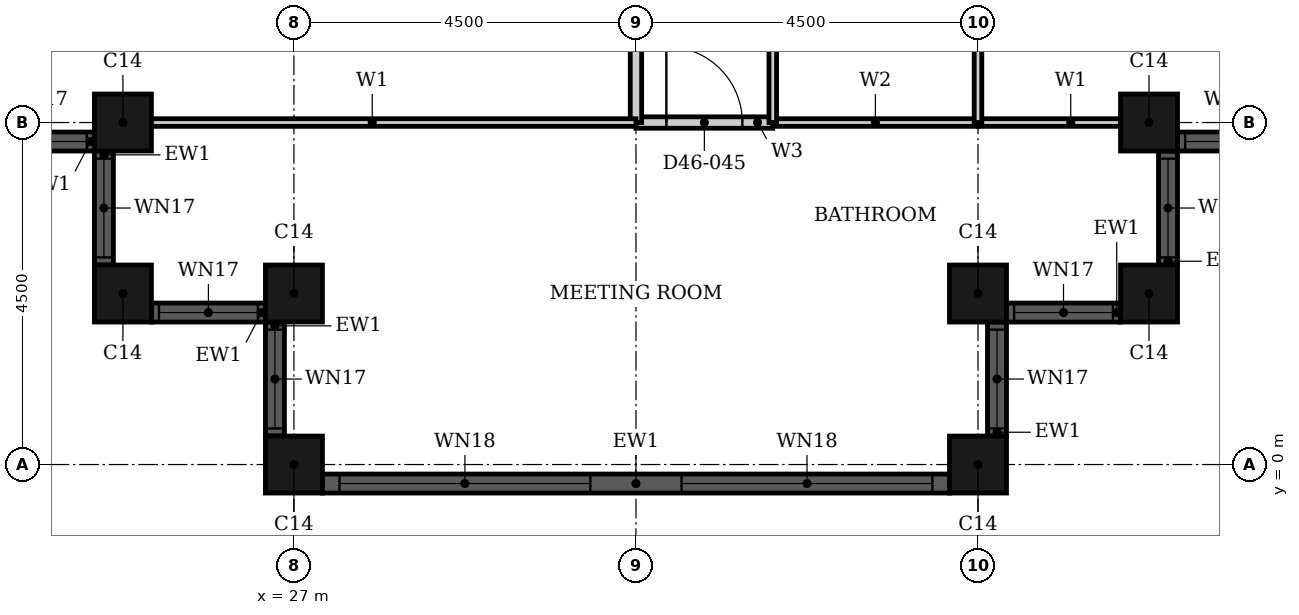
"""IFC4 building model, lengths in metres.
Left out: names, types, materials, properties, quantities, classifications, styles, units other than length and angle.
Written with IfcOpenShell. Run it as: python <this file> out.ifc"""

import sys

from ifc_helpers import new_model, si_unit, direction, frame, frame_2d, origin, origin_2d, place, context, subcontext, project, spatial, rectangle, hollow_rectangle, extrude, element, fill, save


model = new_model("IFC4")
c1 = context("Model", 3, precision=1e-05, world=origin(), true_north=direction((0.0, 1.0)))
c2 = subcontext(c1, "Body", "Model", "MODEL_VIEW")
j1 = project(units=[si_unit("LENGTHUNIT", "METRE"), si_unit("PLANEANGLEUNIT", "RADIAN")], contexts=[c1])
p1 = place(None, origin())
s1 = spatial("IfcSite", under=j1, at=p1, CompositionType="ELEMENT")
p2 = place(p1, origin())
s2 = spatial("IfcBuilding", under=s1, at=p2, CompositionType="ELEMENT")
p3 = place(p2, frame((0.0, 0.0, 183.9)))
s3 = spatial("IfcBuildingStorey", under=s2, at=p3, CompositionType="ELEMENT", Elevation=183.9)
for number, where, z_axis, x_axis in (
    (1, (24.75, 4.5, 0.0), (0.0, 0.0, 1.0), (1.0, 0.0, 0.0)),
    (2, (24.75, 2.25, 0.0), (0.0, 0.0, 1.0), (1.0, 0.0, 0.0)),
    (3, (27.0, 2.25, 0.0), (0.0, 0.0, 1.0), (1.0, 0.0, 0.0)),
    (4, (27.0, 0.0, 0.0), (0.0, 0.0, 1.0), (1.0, 0.0, 0.0)),
    (5, (36.0, 0.0, 0.0), (0.0, 0.0, 1.0), (1.0, 0.0, 0.0)),
    (6, (36.0, 2.25, 0.0), (0.0, 0.0, 1.0), (1.0, 0.0, 0.0)),
    (7, (38.25, 2.25, 0.0), (0.0, 0.0, 1.0), (1.0, 0.0, 0.0)),
    (8, (38.25, 4.5, 0.0), (0.0, 0.0, 1.0), (1.0, 0.0, 0.0)),
):
    element("IfcColumn", number, at=place(p3, frame(where, z_axis=z_axis, x_axis=x_axis)), inside=s3, PredefinedType="COLUMN", context=c2, shape_type="SweptSolid", body=[
        extrude(hollow_rectangle(XDim=0.75, YDim=0.75, WallThickness=0.024, at=origin_2d()), origin(), (0.0, 0.0, 1.0), 3.7),
    ])
p4 = place(p3, frame((22.875, 4.25, 0.0), z_axis=(0.0, 0.0, 1.0), x_axis=(1.0, 0.0, 0.0)))
e9 = element("IfcWall", 9, at=p4, inside=s3, PredefinedType="SOLIDWALL", context=c2, shape_type="SweptSolid", body=[
    extrude(rectangle(XDim=1.5, YDim=0.25, at=frame_2d((0.75, 0.0))), origin(), (0.0, 0.0, 1.0), 3.7),
])
p5 = place(p4, frame((0.1, 0.0, 0.9)))
e10 = element("IfcOpeningElement", 10, at=p5, cuts=e9, PredefinedType="OPENING", context=c2, shape_type="SweptSolid", body=[
    extrude(rectangle(XDim=1.3, YDim=1.95, at=frame_2d((0.65, 0.975))), frame((0.0, 0.135, 0.0), z_axis=(0.0, -1.0, 0.0), x_axis=(1.0, 0.0, 0.0)), (0.0, 0.0, 1.0), 0.27),
])
p6 = place(p3, frame((24.5, 4.125, 0.0), z_axis=(0.0, 0.0, 1.0), x_axis=(0.0, -1.0, 0.0)))
e11 = element("IfcWall", 11, at=p6, inside=s3, PredefinedType="SOLIDWALL", context=c2, shape_type="SweptSolid", body=[
    extrude(rectangle(XDim=1.5, YDim=0.25, at=frame_2d((0.75, 0.0))), origin(), (0.0, 0.0, 1.0), 3.7),
])
p7 = place(p6, frame((0.1, 0.0, 0.9)))
e12 = element("IfcOpeningElement", 12, at=p7, cuts=e11, PredefinedType="OPENING", context=c2, shape_type="SweptSolid", body=[
    extrude(rectangle(XDim=1.3, YDim=1.95, at=frame_2d((0.65, 0.975))), frame((0.0, 0.135, 0.0), z_axis=(0.0, -1.0, 0.0), x_axis=(1.0, 0.0, 0.0)), (0.0, 0.0, 1.0), 0.27),
])
p8 = place(p3, frame((25.125, 2.0, 0.0), z_axis=(0.0, 0.0, 1.0), x_axis=(1.0, 0.0, 0.0)))
e13 = element("IfcWall", 13, at=p8, inside=s3, PredefinedType="SOLIDWALL", context=c2, shape_type="SweptSolid", body=[
    extrude(rectangle(XDim=1.5, YDim=0.25, at=frame_2d((0.75, 0.0))), origin(), (0.0, 0.0, 1.0), 3.7),
])
p9 = place(p8, frame((0.1, 0.0, 0.9)))
e14 = element("IfcOpeningElement", 14, at=p9, cuts=e13, PredefinedType="OPENING", context=c2, shape_type="SweptSolid", body=[
    extrude(rectangle(XDim=1.3, YDim=1.95, at=frame_2d((0.65, 0.975))), frame((0.0, 0.135, 0.0), z_axis=(0.0, -1.0, 0.0), x_axis=(1.0, 0.0, 0.0)), (0.0, 0.0, 1.0), 0.27),
])
p10 = place(p3, frame((26.75, 1.875, 0.0), z_axis=(0.0, 0.0, 1.0), x_axis=(0.0, -1.0, 0.0)))
e15 = element("IfcWall", 15, at=p10, inside=s3, PredefinedType="SOLIDWALL", context=c2, shape_type="SweptSolid", body=[
    extrude(rectangle(XDim=1.5, YDim=0.25, at=frame_2d((0.75, 0.0))), origin(), (0.0, 0.0, 1.0), 3.7),
])
p11 = place(p10, frame((0.1, 0.0, 0.9)))
e16 = element("IfcOpeningElement", 16, at=p11, cuts=e15, PredefinedType="OPENING", context=c2, shape_type="SweptSolid", body=[
    extrude(rectangle(XDim=1.3, YDim=1.95, at=frame_2d((0.65, 0.975))), frame((0.0, 0.135, 0.0), z_axis=(0.0, -1.0, 0.0), x_axis=(1.0, 0.0, 0.0)), (0.0, 0.0, 1.0), 0.27),
])
p12 = place(p3, frame((27.375, -0.25, 0.0), z_axis=(0.0, 0.0, 1.0), x_axis=(1.0, 0.0, 0.0)))
e17 = element("IfcWall", 17, at=p12, inside=s3, PredefinedType="SOLIDWALL", context=c2, shape_type="SweptSolid", body=[
    extrude(rectangle(XDim=8.25, YDim=0.25, at=frame_2d((4.125, 0.0))), origin(), (0.0, 0.0, 1.0), 3.7),
])
p13 = place(p12, frame((0.225, 0.0, 0.45)))
e18 = element("IfcOpeningElement", 18, at=p13, cuts=e17, PredefinedType="OPENING", context=c2, shape_type="SweptSolid", body=[
    extrude(rectangle(XDim=3.3, YDim=2.4, at=frame_2d((1.65, 1.2))), frame((0.0, 0.135, 0.0), z_axis=(0.0, -1.0, 0.0), x_axis=(1.0, 0.0, 0.0)), (0.0, 0.0, 1.0), 0.27),
])
p14 = place(p12, frame((4.725, 0.0, 0.45)))
e19 = element("IfcOpeningElement", 19, at=p14, cuts=e17, PredefinedType="OPENING", context=c2, shape_type="SweptSolid", body=[
    extrude(rectangle(XDim=3.3, YDim=2.4, at=frame_2d((1.65, 1.2))), frame((0.0, 0.135, 0.0), z_axis=(0.0, -1.0, 0.0), x_axis=(1.0, 0.0, 0.0)), (0.0, 0.0, 1.0), 0.27),
])
p15 = place(p3, frame((36.25, 0.375, 0.0), z_axis=(0.0, 0.0, 1.0), x_axis=(0.0, 1.0, 0.0)))
e20 = element("IfcWall", 20, at=p15, inside=s3, PredefinedType="SOLIDWALL", context=c2, shape_type="SweptSolid", body=[
    extrude(rectangle(XDim=1.5, YDim=0.25, at=frame_2d((0.75, 0.0))), origin(), (0.0, 0.0, 1.0), 3.7),
])
p16 = place(p15, frame((0.1, 0.0, 0.9)))
e21 = element("IfcOpeningElement", 21, at=p16, cuts=e20, PredefinedType="OPENING", context=c2, shape_type="SweptSolid", body=[
    extrude(rectangle(XDim=1.3, YDim=1.95, at=frame_2d((0.65, 0.975))), frame((0.0, 0.135, 0.0), z_axis=(0.0, -1.0, 0.0), x_axis=(1.0, 0.0, 0.0)), (0.0, 0.0, 1.0), 0.27),
])
p17 = place(p3, frame((36.375, 2.0, 0.0), z_axis=(0.0, 0.0, 1.0), x_axis=(1.0, 0.0, 0.0)))
e22 = element("IfcWall", 22, at=p17, inside=s3, PredefinedType="SOLIDWALL", context=c2, shape_type="SweptSolid", body=[
    extrude(rectangle(XDim=1.5, YDim=0.25, at=frame_2d((0.75, 0.0))), origin(), (0.0, 0.0, 1.0), 3.7),
])
p18 = place(p17, frame((0.1, 0.0, 0.9)))
e23 = element("IfcOpeningElement", 23, at=p18, cuts=e22, PredefinedType="OPENING", context=c2, shape_type="SweptSolid", body=[
    extrude(rectangle(XDim=1.3, YDim=1.95, at=frame_2d((0.65, 0.975))), frame((0.0, 0.135, 0.0), z_axis=(0.0, -1.0, 0.0), x_axis=(1.0, 0.0, 0.0)), (0.0, 0.0, 1.0), 0.27),
])
p19 = place(p3, frame((38.5, 2.625, 0.0), z_axis=(0.0, 0.0, 1.0), x_axis=(0.0, 1.0, 0.0)))
e24 = element("IfcWall", 24, at=p19, inside=s3, PredefinedType="SOLIDWALL", context=c2, shape_type="SweptSolid", body=[
    extrude(rectangle(XDim=1.5, YDim=0.25, at=frame_2d((0.75, 0.0))), origin(), (0.0, 0.0, 1.0), 3.7),
])
p20 = place(p19, frame((0.1, 0.0, 0.9)))
e25 = element("IfcOpeningElement", 25, at=p20, cuts=e24, PredefinedType="OPENING", context=c2, shape_type="SweptSolid", body=[
    extrude(rectangle(XDim=1.3, YDim=1.95, at=frame_2d((0.65, 0.975))), frame((0.0, 0.135, 0.0), z_axis=(0.0, -1.0, 0.0), x_axis=(1.0, 0.0, 0.0)), (0.0, 0.0, 1.0), 0.27),
])
p21 = place(p3, frame((38.625, 4.25, 0.0), z_axis=(0.0, 0.0, 1.0), x_axis=(1.0, 0.0, 0.0)))
e26 = element("IfcWall", 26, at=p21, inside=s3, PredefinedType="SOLIDWALL", context=c2, shape_type="SweptSolid", body=[
    extrude(rectangle(XDim=1.5, YDim=0.25, at=frame_2d((0.75, 0.0))), origin(), (0.0, 0.0, 1.0), 3.7),
])
p22 = place(p21, frame((0.1, 0.0, 0.9)))
e27 = element("IfcOpeningElement", 27, at=p22, cuts=e26, PredefinedType="OPENING", context=c2, shape_type="SweptSolid", body=[
    extrude(rectangle(XDim=1.3, YDim=1.95, at=frame_2d((0.65, 0.975))), frame((0.0, 0.135, 0.0), z_axis=(0.0, -1.0, 0.0), x_axis=(1.0, 0.0, 0.0)), (0.0, 0.0, 1.0), 0.27),
])
p23 = place(p3, frame((31.5, 4.5, 0.0), z_axis=(0.0, 0.0, 1.0), x_axis=(1.0, 0.0, 0.0)))
e28 = element("IfcWall", 28, at=p23, inside=s3, PredefinedType="PARTITIONING", context=c2, shape_type="SweptSolid", body=[
    extrude(rectangle(XDim=1.8, YDim=0.15, at=frame_2d((0.9, 0.0))), origin(), (0.0, 0.0, 1.0), 3.3),
])
p24 = place(p23, frame((0.4, 0.0, 0.0)))
e29 = element("IfcOpeningElement", 29, at=p24, cuts=e28, PredefinedType="OPENING", context=c2, shape_type="SweptSolid", body=[
    extrude(rectangle(XDim=1.0, YDim=2.1, at=frame_2d((0.5, 1.05))), frame((0.0, 0.085, 0.0), z_axis=(0.0, -1.0, 0.0), x_axis=(1.0, 0.0, 0.0)), (0.0, 0.0, 1.0), 0.17),
])
p25 = place(p3, frame((31.5, 4.5, 0.0), z_axis=(0.0, 0.0, 1.0), x_axis=(0.0, 1.0, 0.0)))
e30 = element("IfcWall", 30, at=p25, inside=s3, PredefinedType="PARTITIONING", context=c2, shape_type="SweptSolid", body=[
    extrude(rectangle(XDim=16.2, YDim=0.15, at=frame_2d((8.1, 0.0))), origin(), (0.0, 0.0, 1.0), 2.58),
])
p26 = place(p25, frame((4.0, 0.0, 0.0)))
e31 = element("IfcOpeningElement", 31, at=p26, cuts=e30, PredefinedType="OPENING", context=c2, shape_type="SweptSolid", body=[
    extrude(rectangle(XDim=1.0, YDim=2.1, at=frame_2d((0.5, 1.05))), frame((0.0, 0.085, 0.0), z_axis=(0.0, -1.0, 0.0), x_axis=(1.0, 0.0, 0.0)), (0.0, 0.0, 1.0), 0.17),
])
p27 = place(p3, frame((36.0, 4.5, 0.0), z_axis=(0.0, 0.0, 1.0), x_axis=(1.0, 0.0, 0.0)))
e32 = element("IfcWall", 32, at=p27, inside=s3, PredefinedType="PARTITIONING", context=c2, shape_type="SweptSolid", body=[
    extrude(rectangle(XDim=2.44, YDim=0.1, at=frame_2d((1.22, 0.0))), origin(), (0.0, 0.0, 1.0), 3.3),
])
p28 = place(p3, frame((24.56, 4.5, 0.0), z_axis=(0.0, 0.0, 1.0), x_axis=(1.0, 0.0, 0.0)))
e33 = element("IfcWall", 33, at=p28, inside=s3, PredefinedType="PARTITIONING", context=c2, shape_type="SweptSolid", body=[
    extrude(rectangle(XDim=6.94, YDim=0.1, at=frame_2d((3.47, 0.0))), origin(), (0.0, 0.0, 1.0), 3.3),
])
p29 = place(p3, frame((33.3, 4.5, 0.0), z_axis=(0.0, 0.0, 1.0), x_axis=(1.0, 0.0, 0.0)))
e34 = element("IfcWall", 34, at=p29, inside=s3, PredefinedType="PARTITIONING", context=c2, shape_type="SweptSolid", body=[
    extrude(rectangle(XDim=2.7, YDim=0.1, at=frame_2d((1.35, 0.0))), origin(), (0.0, 0.0, 1.0), 3.3),
])
p30 = place(p3, frame((33.3, 4.5, 0.0), z_axis=(0.0, 0.0, 1.0), x_axis=(0.0, 1.0, 0.0)))
e35 = element("IfcWall", 35, at=p30, inside=s3, PredefinedType="PARTITIONING", context=c2, shape_type="SweptSolid", body=[
    extrude(rectangle(XDim=2.4, YDim=0.1, at=frame_2d((1.2, 0.0))), origin(), (0.0, 0.0, 1.0), 3.3),
])
p31 = place(p3, frame((36.0, 4.5, 0.0), z_axis=(0.0, 0.0, 1.0), x_axis=(0.0, 1.0, 0.0)))
e36 = element("IfcWall", 36, at=p31, inside=s3, PredefinedType="PARTITIONING", context=c2, shape_type="SweptSolid", body=[
    extrude(rectangle(XDim=2.4, YDim=0.1, at=frame_2d((1.2, 0.0))), origin(), (0.0, 0.0, 1.0), 2.58),
])
p32 = place(p5, origin())
e37 = element("IfcWindow", 37, at=p32, inside=s3, PartitioningType="SINGLE_PANEL", PredefinedType="WINDOW", context=c2, shape_type="SweptSolid", body=[
    extrude(rectangle(XDim=1.3, YDim=1.95, at=frame_2d((0.65, 0.975))), frame((0.0, 0.03, 0.0), z_axis=(0.0, -1.0, 0.0), x_axis=(1.0, 0.0, 0.0)), (0.0, 0.0, 1.0), 0.06),
])
fill(e10, e37)
p33 = place(p7, origin())
e38 = element("IfcWindow", 38, at=p33, inside=s3, PartitioningType="SINGLE_PANEL", PredefinedType="WINDOW", context=c2, shape_type="SweptSolid", body=[
    extrude(rectangle(XDim=1.3, YDim=1.95, at=frame_2d((0.65, 0.975))), frame((0.0, 0.03, 0.0), z_axis=(0.0, -1.0, 0.0), x_axis=(1.0, 0.0, 0.0)), (0.0, 0.0, 1.0), 0.06),
])
fill(e12, e38)
p34 = place(p9, origin())
e39 = element("IfcWindow", 39, at=p34, inside=s3, PartitioningType="SINGLE_PANEL", PredefinedType="WINDOW", context=c2, shape_type="SweptSolid", body=[
    extrude(rectangle(XDim=1.3, YDim=1.95, at=frame_2d((0.65, 0.975))), frame((0.0, 0.03, 0.0), z_axis=(0.0, -1.0, 0.0), x_axis=(1.0, 0.0, 0.0)), (0.0, 0.0, 1.0), 0.06),
])
fill(e14, e39)
p35 = place(p11, origin())
e40 = element("IfcWindow", 40, at=p35, inside=s3, PartitioningType="SINGLE_PANEL", PredefinedType="WINDOW", context=c2, shape_type="SweptSolid", body=[
    extrude(rectangle(XDim=1.3, YDim=1.95, at=frame_2d((0.65, 0.975))), frame((0.0, 0.03, 0.0), z_axis=(0.0, -1.0, 0.0), x_axis=(1.0, 0.0, 0.0)), (0.0, 0.0, 1.0), 0.06),
])
fill(e16, e40)
p36 = place(p13, origin())
e41 = element("IfcWindow", 41, at=p36, inside=s3, PartitioningType="SINGLE_PANEL", PredefinedType="WINDOW", context=c2, shape_type="SweptSolid", body=[
    extrude(rectangle(XDim=3.3, YDim=2.4, at=frame_2d((1.65, 1.2))), frame((0.0, 0.03, 0.0), z_axis=(0.0, -1.0, 0.0), x_axis=(1.0, 0.0, 0.0)), (0.0, 0.0, 1.0), 0.06),
])
fill(e18, e41)
p37 = place(p14, origin())
e42 = element("IfcWindow", 42, at=p37, inside=s3, PartitioningType="SINGLE_PANEL", PredefinedType="WINDOW", context=c2, shape_type="SweptSolid", body=[
    extrude(rectangle(XDim=3.3, YDim=2.4, at=frame_2d((1.65, 1.2))), frame((0.0, 0.03, 0.0), z_axis=(0.0, -1.0, 0.0), x_axis=(1.0, 0.0, 0.0)), (0.0, 0.0, 1.0), 0.06),
])
fill(e19, e42)
p38 = place(p16, origin())
e43 = element("IfcWindow", 43, at=p38, inside=s3, PartitioningType="SINGLE_PANEL", PredefinedType="WINDOW", context=c2, shape_type="SweptSolid", body=[
    extrude(rectangle(XDim=1.3, YDim=1.95, at=frame_2d((0.65, 0.975))), frame((0.0, 0.03, 0.0), z_axis=(0.0, -1.0, 0.0), x_axis=(1.0, 0.0, 0.0)), (0.0, 0.0, 1.0), 0.06),
])
fill(e21, e43)
p39 = place(p18, origin())
e44 = element("IfcWindow", 44, at=p39, inside=s3, PartitioningType="SINGLE_PANEL", PredefinedType="WINDOW", context=c2, shape_type="SweptSolid", body=[
    extrude(rectangle(XDim=1.3, YDim=1.95, at=frame_2d((0.65, 0.975))), frame((0.0, 0.03, 0.0), z_axis=(0.0, -1.0, 0.0), x_axis=(1.0, 0.0, 0.0)), (0.0, 0.0, 1.0), 0.06),
])
fill(e23, e44)
p40 = place(p20, origin())
e45 = element("IfcWindow", 45, at=p40, inside=s3, PartitioningType="SINGLE_PANEL", PredefinedType="WINDOW", context=c2, shape_type="SweptSolid", body=[
    extrude(rectangle(XDim=1.3, YDim=1.95, at=frame_2d((0.65, 0.975))), frame((0.0, 0.03, 0.0), z_axis=(0.0, -1.0, 0.0), x_axis=(1.0, 0.0, 0.0)), (0.0, 0.0, 1.0), 0.06),
])
fill(e25, e45)
p41 = place(p22, origin())
e46 = element("IfcWindow", 46, at=p41, inside=s3, PartitioningType="SINGLE_PANEL", PredefinedType="WINDOW", context=c2, shape_type="SweptSolid", body=[
    extrude(rectangle(XDim=1.3, YDim=1.95, at=frame_2d((0.65, 0.975))), frame((0.0, 0.03, 0.0), z_axis=(0.0, -1.0, 0.0), x_axis=(1.0, 0.0, 0.0)), (0.0, 0.0, 1.0), 0.06),
])
fill(e27, e46)
p42 = place(p24, origin())
e47 = element("IfcDoor", 47, at=p42, inside=s3, OperationType="SINGLE_SWING_LEFT", PredefinedType="DOOR", context=c2, shape_type="SweptSolid", body=[
    extrude(rectangle(XDim=1.0, YDim=2.1, at=frame_2d((0.5, 1.05))), frame((0.0, 0.025, 0.0), z_axis=(0.0, -1.0, 0.0), x_axis=(1.0, 0.0, 0.0)), (0.0, 0.0, 1.0), 0.05),
])
fill(e29, e47)
save(model, sys.argv[1])
